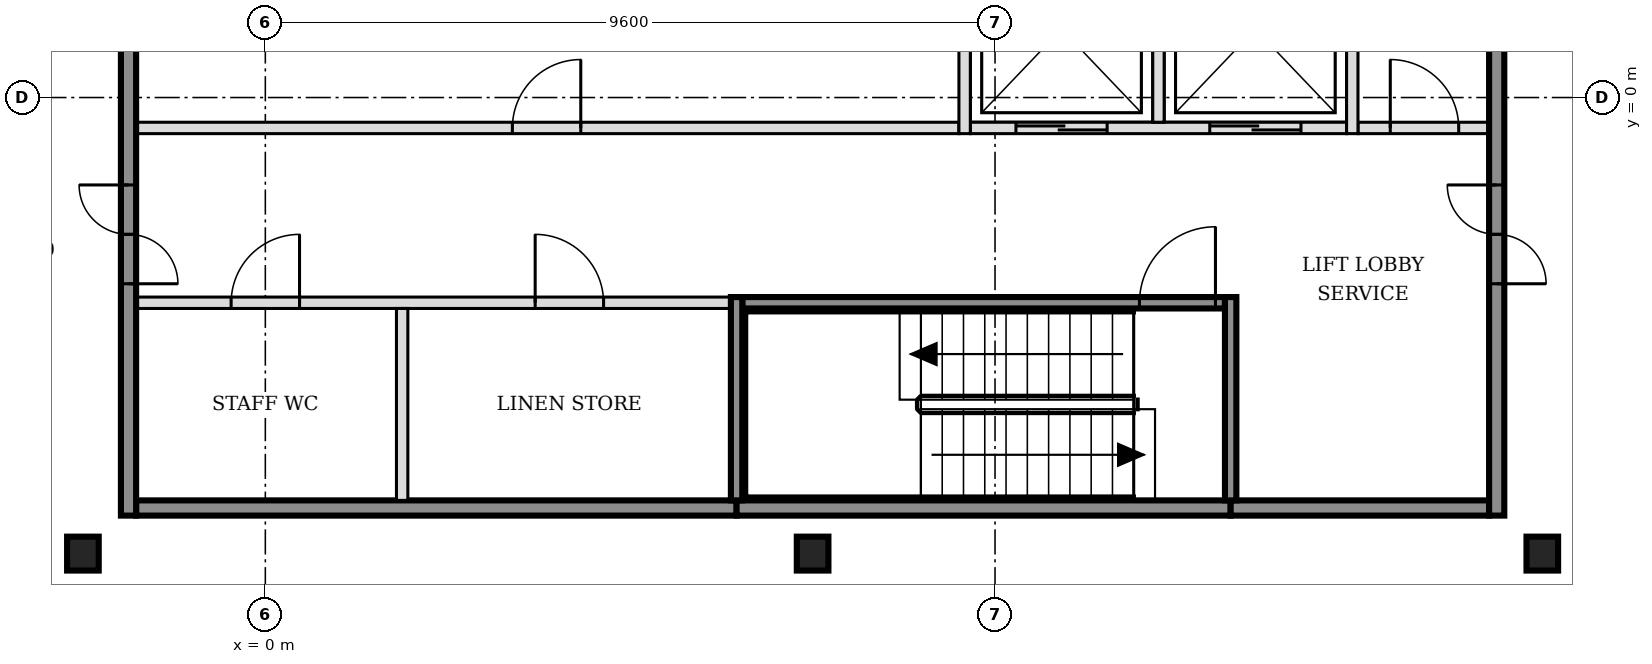
"""IFC4 building model, lengths in metres.
Left out: names, types, materials, properties, quantities, classifications, styles, units other than length and angle.
Written with IfcOpenShell. Run it as: python <this file> out.ifc"""

import sys

from ifc_helpers import new_model, si_unit, direction, frame, frame_2d, origin, origin_2d, place, context, subcontext, project, spatial, rectangle, i_section, extrude, element, fill, save


model = new_model("IFC4")
c1 = context("Model", 3, precision=1e-05, world=origin(), true_north=direction((0.0, 1.0)))
c2 = subcontext(c1, "Body", "Model", "MODEL_VIEW")
j1 = project(units=[si_unit("LENGTHUNIT", "METRE"), si_unit("PLANEANGLEUNIT", "RADIAN")], contexts=[c1])
p1 = place(None, origin())
s1 = spatial("IfcSite", under=j1, at=p1, CompositionType="ELEMENT")
p2 = place(p1, origin())
s2 = spatial("IfcBuilding", under=s1, at=p2, CompositionType="ELEMENT")
p3 = place(p2, frame((0.0, 0.0, 157.8)))
s3 = spatial("IfcBuildingStorey", under=s2, at=p3, CompositionType="ELEMENT", Elevation=157.8)
for number, where, z_axis, x_axis in (
    (1, (-2.4, -6.0, -0.15), (0.0, 0.0, 1.0), (1.0, 0.0, 0.0)),
    (2, (7.2, -6.0, -0.15), (0.0, 0.0, 1.0), (1.0, 0.0, 0.0)),
    (3, (16.8, -6.0, -0.15), (0.0, 0.0, 1.0), (1.0, 0.0, 0.0)),
):
    element("IfcColumn", number, at=place(p3, frame(where, z_axis=z_axis, x_axis=x_axis)), inside=s3, PredefinedType="COLUMN", context=c2, shape_type="SweptSolid", body=[
        extrude(i_section(OverallWidth=0.416, OverallDepth=0.446, WebThickness=0.039, FlangeThickness=0.063, FilletRadius=0.015, at=origin_2d()), origin(), (0.0, 0.0, 1.0), 3.6),
    ])
p4 = place(p3, frame((-1.7, -5.4, 0.0), z_axis=(0.0, 0.0, 1.0), x_axis=(1.0, 0.0, 0.0)))
e4 = element("IfcWall", 4, at=p4, inside=s3, PredefinedType="SOLIDWALL", context=c2, shape_type="SweptSolid", body=[
    extrude(rectangle(XDim=7.9, YDim=0.2, at=frame_2d((3.95, 0.0))), origin(), (0.0, 0.0, 1.0), 3.45),
])
p5 = place(p3, frame((6.2, -5.4, 0.0), z_axis=(0.0, 0.0, 1.0), x_axis=(1.0, 0.0, 0.0)))
e5 = element("IfcWall", 5, at=p5, inside=s3, PredefinedType="SOLIDWALL", context=c2, shape_type="SweptSolid", body=[
    extrude(rectangle(XDim=6.5, YDim=0.2, at=frame_2d((3.25, 0.0))), origin(), (0.0, 0.0, 1.0), 3.45),
])
p6 = place(p3, frame((12.7, -5.4, 0.0), z_axis=(0.0, 0.0, 1.0), x_axis=(1.0, 0.0, 0.0)))
e6 = element("IfcWall", 6, at=p6, inside=s3, PredefinedType="SOLIDWALL", context=c2, shape_type="SweptSolid", body=[
    extrude(rectangle(XDim=3.4, YDim=0.2, at=frame_2d((1.7, 0.0))), origin(), (0.0, 0.0, 1.0), 3.45),
])
p7 = place(p3, frame((-1.7, -2.7, 0.0), z_axis=(0.0, 0.0, 1.0), x_axis=(1.0, 0.0, 0.0)))
e7 = element("IfcWall", 7, at=p7, inside=s3, PredefinedType="PARTITIONING", context=c2, shape_type="SweptSolid", body=[
    extrude(rectangle(XDim=7.825, YDim=0.15, at=frame_2d((3.913, 0.0))), origin(), (0.0, 0.0, 1.0), 3.45),
])
p8 = place(p7, frame((1.25, 0.0, 0.0)))
e8 = element("IfcOpeningElement", 8, at=p8, cuts=e7, PredefinedType="OPENING", context=c2, shape_type="SweptSolid", body=[
    extrude(rectangle(XDim=0.9, YDim=2.1, at=frame_2d((0.45, 1.05))), frame((0.0, 0.085, 0.0), z_axis=(0.0, -1.0, 0.0), x_axis=(1.0, 0.0, 0.0)), (0.0, 0.0, 1.0), 0.17),
])
p9 = place(p7, frame((5.25, 0.0, 0.0)))
e9 = element("IfcOpeningElement", 9, at=p9, cuts=e7, PredefinedType="OPENING", context=c2, shape_type="SweptSolid", body=[
    extrude(rectangle(XDim=0.9, YDim=2.1, at=frame_2d((0.45, 1.05))), frame((0.0, 0.085, 0.0), z_axis=(0.0, -1.0, 0.0), x_axis=(1.0, 0.0, 0.0)), (0.0, 0.0, 1.0), 0.17),
])
p10 = place(p3, frame((6.275, -2.7, 0.0), z_axis=(0.0, 0.0, 1.0), x_axis=(1.0, 0.0, 0.0)))
e10 = element("IfcWall", 10, at=p10, inside=s3, PredefinedType="SOLIDWALL", context=c2, shape_type="SweptSolid", body=[
    extrude(rectangle(XDim=6.35, YDim=0.15, at=frame_2d((3.175, 0.0))), origin(), (0.0, 0.0, 1.0), 3.45),
])
p11 = place(p10, frame((5.225, 0.0, 0.0)))
e11 = element("IfcOpeningElement", 11, at=p11, cuts=e10, PredefinedType="OPENING", context=c2, shape_type="SweptSolid", body=[
    extrude(rectangle(XDim=1.0, YDim=2.1, at=frame_2d((0.5, 1.05))), frame((0.0, 0.085, 0.0), z_axis=(0.0, -1.0, 0.0), x_axis=(1.0, 0.0, 0.0)), (0.0, 0.0, 1.0), 0.17),
])
p12 = place(p3, frame((-1.7, -0.4, 0.0), z_axis=(0.0, 0.0, 1.0), x_axis=(1.0, 0.0, 0.0)))
e12 = element("IfcWall", 12, at=p12, inside=s3, PredefinedType="PARTITIONING", context=c2, shape_type="SweptSolid", body=[
    extrude(rectangle(XDim=10.825, YDim=0.15, at=frame_2d((5.413, 0.0))), origin(), (0.0, 0.0, 1.0), 3.45),
])
p13 = place(p12, frame((4.95, 0.0, 0.0)))
e13 = element("IfcOpeningElement", 13, at=p13, cuts=e12, PredefinedType="OPENING", context=c2, shape_type="SweptSolid", body=[
    extrude(rectangle(XDim=0.9, YDim=2.1, at=frame_2d((0.45, 1.05))), frame((0.0, 0.085, 0.0), z_axis=(0.0, -1.0, 0.0), x_axis=(1.0, 0.0, 0.0)), (0.0, 0.0, 1.0), 0.17),
])
p14 = place(p3, frame((9.275, -0.4, 0.0), z_axis=(0.0, 0.0, 1.0), x_axis=(1.0, 0.0, 0.0)))
e14 = element("IfcWall", 14, at=p14, inside=s3, PredefinedType="SOLIDWALL", context=c2, shape_type="SweptSolid", body=[
    extrude(rectangle(XDim=4.95, YDim=0.15, at=frame_2d((2.475, 0.0))), origin(), (0.0, 0.0, 1.0), 3.45),
])
p15 = place(p14, frame((0.6, 0.0, 0.0)))
e15 = element("IfcOpeningElement", 15, at=p15, cuts=e14, PredefinedType="OPENING", context=c2, shape_type="SweptSolid", body=[
    extrude(rectangle(XDim=1.2, YDim=2.1, at=frame_2d((0.6, 1.05))), frame((0.0, 0.085, 0.0), z_axis=(0.0, -1.0, 0.0), x_axis=(1.0, 0.0, 0.0)), (0.0, 0.0, 1.0), 0.17),
])
p16 = place(p14, frame((3.15, 0.0, 0.0)))
e16 = element("IfcOpeningElement", 16, at=p16, cuts=e14, PredefinedType="OPENING", context=c2, shape_type="SweptSolid", body=[
    extrude(rectangle(XDim=1.2, YDim=2.1, at=frame_2d((0.6, 1.05))), frame((0.0, 0.085, 0.0), z_axis=(0.0, -1.0, 0.0), x_axis=(1.0, 0.0, 0.0)), (0.0, 0.0, 1.0), 0.17),
])
p17 = place(p3, frame((14.375, -0.4, 0.0), z_axis=(0.0, 0.0, 1.0), x_axis=(1.0, 0.0, 0.0)))
e17 = element("IfcWall", 17, at=p17, inside=s3, PredefinedType="PARTITIONING", context=c2, shape_type="SweptSolid", body=[
    extrude(rectangle(XDim=1.725, YDim=0.15, at=frame_2d((0.863, 0.0))), origin(), (0.0, 0.0, 1.0), 3.45),
])
p18 = place(p17, frame((0.425, 0.0, 0.0)))
e18 = element("IfcOpeningElement", 18, at=p18, cuts=e17, PredefinedType="OPENING", context=c2, shape_type="SweptSolid", body=[
    extrude(rectangle(XDim=0.9, YDim=2.1, at=frame_2d((0.45, 1.05))), frame((0.0, 0.085, 0.0), z_axis=(0.0, -1.0, 0.0), x_axis=(1.0, 0.0, 0.0)), (0.0, 0.0, 1.0), 0.17),
])
p19 = place(p3, frame((-1.8, -5.5, 0.0), z_axis=(0.0, 0.0, 1.0), x_axis=(0.0, 1.0, 0.0)))
e19 = element("IfcWall", 19, at=p19, inside=s3, PredefinedType="SOLIDWALL", context=c2, shape_type="SweptSolid", body=[
    extrude(rectangle(XDim=15.8, YDim=0.2, at=frame_2d((7.9, 0.0))), origin(), (0.0, 0.0, 1.0), 3.45),
])
p20 = place(p19, frame((3.05, 0.0, 0.0)))
e20 = element("IfcOpeningElement", 20, at=p20, cuts=e19, PredefinedType="OPENING", context=c2, shape_type="SweptSolid", body=[
    extrude(rectangle(XDim=1.3, YDim=2.1, at=frame_2d((0.65, 1.05))), frame((0.0, 0.11, 0.0), z_axis=(0.0, -1.0, 0.0), x_axis=(1.0, 0.0, 0.0)), (0.0, 0.0, 1.0), 0.22),
])
p21 = place(p19, frame((11.45, 0.0, 0.0)))
e21 = element("IfcOpeningElement", 21, at=p21, cuts=e19, PredefinedType="OPENING", context=c2, shape_type="SweptSolid", body=[
    extrude(rectangle(XDim=1.3, YDim=2.1, at=frame_2d((0.65, 1.05))), frame((0.0, 0.11, 0.0), z_axis=(0.0, -1.0, 0.0), x_axis=(1.0, 0.0, 0.0)), (0.0, 0.0, 1.0), 0.22),
])
p22 = place(p3, frame((1.8, -5.3, 0.0), z_axis=(0.0, 0.0, 1.0), x_axis=(0.0, 1.0, 0.0)))
e22 = element("IfcWall", 22, at=p22, inside=s3, PredefinedType="PARTITIONING", context=c2, shape_type="SweptSolid", body=[
    extrude(rectangle(XDim=2.525, YDim=0.15, at=frame_2d((1.263, 0.0))), origin(), (0.0, 0.0, 1.0), 3.45),
])
p23 = place(p3, frame((6.2, -5.3, 0.0), z_axis=(0.0, 0.0, 1.0), x_axis=(0.0, 1.0, 0.0)))
e23 = element("IfcWall", 23, at=p23, inside=s3, PredefinedType="SOLIDWALL", context=c2, shape_type="SweptSolid", body=[
    extrude(rectangle(XDim=2.675, YDim=0.15, at=frame_2d((1.337, 0.0))), origin(), (0.0, 0.0, 1.0), 3.45),
])
p24 = place(p3, frame((9.2, -0.475, 0.0), z_axis=(0.0, 0.0, 1.0), x_axis=(0.0, 1.0, 0.0)))
e24 = element("IfcWall", 24, at=p24, inside=s3, PredefinedType="SOLIDWALL", context=c2, shape_type="SweptSolid", body=[
    extrude(rectangle(XDim=2.6, YDim=0.15, at=frame_2d((1.3, 0.0))), origin(), (0.0, 0.0, 1.0), 3.45),
])
p25 = place(p3, frame((11.75, -0.325, 0.0), z_axis=(0.0, 0.0, 1.0), x_axis=(0.0, 1.0, 0.0)))
e25 = element("IfcWall", 25, at=p25, inside=s3, PredefinedType="SOLIDWALL", context=c2, shape_type="SweptSolid", body=[
    extrude(rectangle(XDim=2.45, YDim=0.15, at=frame_2d((1.225, 0.0))), origin(), (0.0, 0.0, 1.0), 3.45),
])
p26 = place(p3, frame((12.7, -5.3, 0.0), z_axis=(0.0, 0.0, 1.0), x_axis=(0.0, 1.0, 0.0)))
e26 = element("IfcWall", 26, at=p26, inside=s3, PredefinedType="SOLIDWALL", context=c2, shape_type="SweptSolid", body=[
    extrude(rectangle(XDim=2.675, YDim=0.15, at=frame_2d((1.337, 0.0))), origin(), (0.0, 0.0, 1.0), 3.45),
])
p27 = place(p3, frame((14.3, -0.475, 0.0), z_axis=(0.0, 0.0, 1.0), x_axis=(0.0, 1.0, 0.0)))
e27 = element("IfcWall", 27, at=p27, inside=s3, PredefinedType="SOLIDWALL", context=c2, shape_type="SweptSolid", body=[
    extrude(rectangle(XDim=2.75, YDim=0.15, at=frame_2d((1.375, 0.0))), origin(), (0.0, 0.0, 1.0), 3.45),
])
p28 = place(p3, frame((16.2, -5.5, 0.0), z_axis=(0.0, 0.0, 1.0), x_axis=(0.0, 1.0, 0.0)))
e28 = element("IfcWall", 28, at=p28, inside=s3, PredefinedType="SOLIDWALL", context=c2, shape_type="SweptSolid", body=[
    extrude(rectangle(XDim=15.8, YDim=0.2, at=frame_2d((7.9, 0.0))), origin(), (0.0, 0.0, 1.0), 3.45),
])
p29 = place(p28, frame((3.05, 0.0, 0.0)))
e29 = element("IfcOpeningElement", 29, at=p29, cuts=e28, PredefinedType="OPENING", context=c2, shape_type="SweptSolid", body=[
    extrude(rectangle(XDim=1.3, YDim=2.1, at=frame_2d((0.65, 1.05))), frame((0.0, 0.11, 0.0), z_axis=(0.0, -1.0, 0.0), x_axis=(1.0, 0.0, 0.0)), (0.0, 0.0, 1.0), 0.22),
])
p30 = place(p28, frame((11.45, 0.0, 0.0)))
e30 = element("IfcOpeningElement", 30, at=p30, cuts=e28, PredefinedType="OPENING", context=c2, shape_type="SweptSolid", body=[
    extrude(rectangle(XDim=1.3, YDim=2.1, at=frame_2d((0.65, 1.05))), frame((0.0, 0.11, 0.0), z_axis=(0.0, -1.0, 0.0), x_axis=(1.0, 0.0, 0.0)), (0.0, 0.0, 1.0), 0.22),
])
p31 = place(p15, origin())
e31 = element("IfcDoor", 31, at=p31, inside=s3, OperationType="DOUBLE_DOOR_SLIDING", PredefinedType="DOOR", context=c2, shape_type="SweptSolid", body=[
    extrude(rectangle(XDim=1.2, YDim=2.1, at=frame_2d((0.6, 1.05))), frame((0.0, 0.025, 0.0), z_axis=(0.0, -1.0, 0.0), x_axis=(1.0, 0.0, 0.0)), (0.0, 0.0, 1.0), 0.05),
])
fill(e15, e31)
p32 = place(p16, origin())
e32 = element("IfcDoor", 32, at=p32, inside=s3, OperationType="DOUBLE_DOOR_SLIDING", PredefinedType="DOOR", context=c2, shape_type="SweptSolid", body=[
    extrude(rectangle(XDim=1.2, YDim=2.1, at=frame_2d((0.6, 1.05))), frame((0.0, 0.025, 0.0), z_axis=(0.0, -1.0, 0.0), x_axis=(1.0, 0.0, 0.0)), (0.0, 0.0, 1.0), 0.05),
])
fill(e16, e32)
p33 = place(p11, origin())
e33 = element("IfcDoor", 33, at=p33, inside=s3, OperationType="SINGLE_SWING_RIGHT", PredefinedType="DOOR", context=c2, shape_type="SweptSolid", body=[
    extrude(rectangle(XDim=1.0, YDim=2.1, at=frame_2d((0.5, 1.05))), frame((0.0, 0.025, 0.0), z_axis=(0.0, -1.0, 0.0), x_axis=(1.0, 0.0, 0.0)), (0.0, 0.0, 1.0), 0.05),
])
fill(e11, e33)
p34 = place(p20, origin())
e34 = element("IfcDoor", 34, at=p34, inside=s3, OperationType="DOUBLE_DOOR_SINGLE_SWING", PredefinedType="DOOR", context=c2, shape_type="SweptSolid", body=[
    extrude(rectangle(XDim=1.3, YDim=2.1, at=frame_2d((0.65, 1.05))), frame((0.0, 0.025, 0.0), z_axis=(0.0, -1.0, 0.0), x_axis=(1.0, 0.0, 0.0)), (0.0, 0.0, 1.0), 0.05),
])
fill(e20, e34)
p35 = place(p29, origin())
e35 = element("IfcDoor", 35, at=p35, inside=s3, OperationType="DOUBLE_DOOR_SINGLE_SWING", PredefinedType="DOOR", context=c2, shape_type="SweptSolid", body=[
    extrude(rectangle(XDim=1.3, YDim=2.1, at=frame_2d((0.65, 1.05))), frame((0.0, 0.025, 0.0), z_axis=(0.0, -1.0, 0.0), x_axis=(1.0, 0.0, 0.0)), (0.0, 0.0, 1.0), 0.05),
])
fill(e29, e35)
p36 = place(p18, origin())
e36 = element("IfcDoor", 36, at=p36, inside=s3, OperationType="SINGLE_SWING_LEFT", PredefinedType="DOOR", context=c2, shape_type="SweptSolid", body=[
    extrude(rectangle(XDim=0.9, YDim=2.1, at=frame_2d((0.45, 1.05))), frame((0.0, 0.025, 0.0), z_axis=(0.0, -1.0, 0.0), x_axis=(1.0, 0.0, 0.0)), (0.0, 0.0, 1.0), 0.05),
])
fill(e18, e36)
p37 = place(p8, origin())
e37 = element("IfcDoor", 37, at=p37, inside=s3, OperationType="SINGLE_SWING_RIGHT", PredefinedType="DOOR", context=c2, shape_type="SweptSolid", body=[
    extrude(rectangle(XDim=0.9, YDim=2.1, at=frame_2d((0.45, 1.05))), frame((0.0, 0.025, 0.0), z_axis=(0.0, -1.0, 0.0), x_axis=(1.0, 0.0, 0.0)), (0.0, 0.0, 1.0), 0.05),
])
fill(e8, e37)
p38 = place(p9, origin())
e38 = element("IfcDoor", 38, at=p38, inside=s3, OperationType="SINGLE_SWING_LEFT", PredefinedType="DOOR", context=c2, shape_type="SweptSolid", body=[
    extrude(rectangle(XDim=0.9, YDim=2.1, at=frame_2d((0.45, 1.05))), frame((0.0, 0.025, 0.0), z_axis=(0.0, -1.0, 0.0), x_axis=(1.0, 0.0, 0.0)), (0.0, 0.0, 1.0), 0.05),
])
fill(e9, e38)
p39 = place(p13, origin())
e39 = element("IfcDoor", 39, at=p39, inside=s3, OperationType="SINGLE_SWING_RIGHT", PredefinedType="DOOR", context=c2, shape_type="SweptSolid", body=[
    extrude(rectangle(XDim=0.9, YDim=2.1, at=frame_2d((0.45, 1.05))), frame((0.0, 0.025, 0.0), z_axis=(0.0, -1.0, 0.0), x_axis=(1.0, 0.0, 0.0)), (0.0, 0.0, 1.0), 0.05),
])
fill(e13, e39)
save(model, sys.argv[1])
